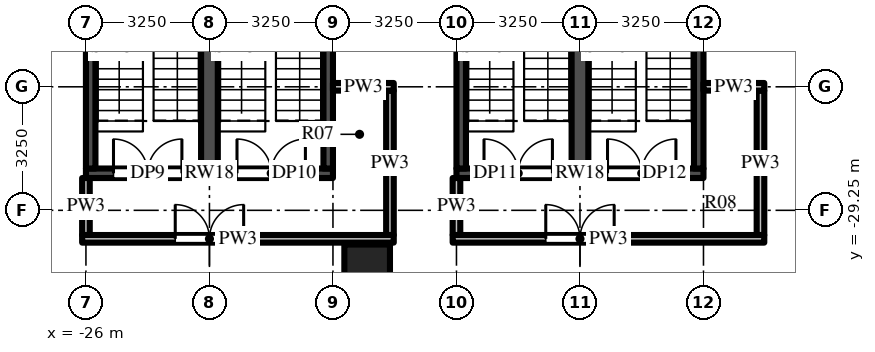
"""IFC4 building model, lengths in metres.
Left out: names, types, materials, properties, quantities, classifications, styles, units other than length and angle.
Written with IfcOpenShell. Run it as: python <this file> out.ifc"""

import sys

from ifc_helpers import new_model, si_unit, direction, frame, frame_2d, origin, origin_2d, place, context, subcontext, project, spatial, rectangle, extrude, source, transform, mapped, element, fill, save


model = new_model("IFC4")
c1 = context("Model", 3, precision=1e-05, world=origin(), true_north=direction((0.0, 1.0)))
c2 = subcontext(c1, "Body", "Model", "MODEL_VIEW")
j1 = project(units=[si_unit("LENGTHUNIT", "METRE"), si_unit("PLANEANGLEUNIT", "RADIAN")], contexts=[c1])
p1 = place(None, origin())
s1 = spatial("IfcSite", under=j1, at=p1, CompositionType="ELEMENT")
p2 = place(p1, origin())
s2 = spatial("IfcBuilding", under=s1, at=p2, CompositionType="ELEMENT")
p3 = place(p2, frame((0.0, 0.0, 8.0)))
s3 = spatial("IfcBuildingStorey", under=s2, at=p3, CompositionType="ELEMENT", Elevation=8.0)
m1 = source(origin(), c2, "Body", "SweptSolid", [
    extrude(rectangle(XDim=1.2, YDim=1.2, at=origin_2d()), origin(), (0.0, 0.0, 1.0), 6.0),
])
p4 = place(p3, frame((-18.6, -30.75, 0.0), z_axis=(0.0, 0.0, 1.0), x_axis=(1.0, 0.0, 0.0)))
e1 = element("IfcColumn", 1, at=p4, inside=s3, PredefinedType="COLUMN", context=c2, shape_type="MappedRepresentation", body=[
    mapped(m1, transform((0.0, 0.0, 0.0))),
])
m2 = source(origin(), c2, "Body", "SweptSolid", [
    extrude(rectangle(XDim=6.5, YDim=0.25, at=frame_2d((3.25, 0.0))), origin(), (0.0, 0.0, 1.0), 5.7),
])
p5 = place(p3, frame((-26.0, -28.275, 0.0), z_axis=(0.0, 0.0, 1.0), x_axis=(1.0, 0.0, 0.0)))
e2 = element("IfcWall", 2, at=p5, inside=s3, PredefinedType="SHEAR", context=c2, shape_type="MappedRepresentation", body=[
    mapped(m2, transform((0.0, 0.0, 0.0))),
])
m3 = source(origin(), c2, "Body", "SweptSolid", [
    extrude(rectangle(XDim=1.8, YDim=2.1, at=frame_2d((0.9, 1.05))), frame((0.0, 0.135, 0.0), z_axis=(0.0, -1.0, 0.0), x_axis=(1.0, 0.0, 0.0)), (0.0, 0.0, 1.0), 0.27),
])
p6 = place(p5, frame((0.725, 0.0, 0.0)))
e3 = element("IfcOpeningElement", 3, at=p6, cuts=e2, PredefinedType="OPENING", context=c2, shape_type="MappedRepresentation", body=[
    mapped(m3, transform((0.0, 0.0, 0.0))),
])
p7 = place(p5, frame((3.975, 0.0, 0.0)))
e4 = element("IfcOpeningElement", 4, at=p7, cuts=e2, PredefinedType="OPENING", context=c2, shape_type="MappedRepresentation", body=[
    mapped(m3, transform((0.0, 0.0, 0.0))),
])
m4 = source(origin(), c2, "Body", "SweptSolid", [
    extrude(rectangle(XDim=8.3, YDim=0.25, at=frame_2d((4.15, 0.0))), origin(), (0.0, 0.0, 1.0), 5.7),
])
for number, where, z_axis, x_axis in (
    (5, (-25.875, -28.15, 0.0), (0.0, 0.0, 1.0), (0.0, 1.0, 0.0)),
    (6, (-19.625, -28.15, 0.0), (0.0, 0.0, 1.0), (0.0, 1.0, 0.0)),
):
    element("IfcWall", number, at=place(p3, frame(where, z_axis=z_axis, x_axis=x_axis)), inside=s3, PredefinedType="SHEAR", context=c2, shape_type="MappedRepresentation", body=[
        mapped(m4, transform((0.0, 0.0, 0.0))),
    ])
m5 = source(origin(), c2, "Body", "SweptSolid", [
    extrude(rectangle(XDim=8.3, YDim=0.44, at=frame_2d((4.15, 0.0))), origin(), (0.0, 0.0, 1.0), 5.7),
])
p8 = place(p3, frame((-22.75, -28.15, 0.0), z_axis=(0.0, 0.0, 1.0), x_axis=(0.0, 1.0, 0.0)))
e7 = element("IfcWall", 7, at=p8, inside=s3, PredefinedType="SHEAR", context=c2, shape_type="MappedRepresentation", body=[
    mapped(m5, transform((0.0, 0.0, 0.0))),
])
p9 = place(p3, frame((-16.25, -28.275, 0.0), z_axis=(0.0, 0.0, 1.0), x_axis=(1.0, 0.0, 0.0)))
e8 = element("IfcWall", 8, at=p9, inside=s3, PredefinedType="SHEAR", context=c2, shape_type="MappedRepresentation", body=[
    mapped(m2, transform((0.0, 0.0, 0.0))),
])
p10 = place(p9, frame((0.725, 0.0, 0.0)))
e9 = element("IfcOpeningElement", 9, at=p10, cuts=e8, PredefinedType="OPENING", context=c2, shape_type="MappedRepresentation", body=[
    mapped(m3, transform((0.0, 0.0, 0.0))),
])
p11 = place(p9, frame((3.975, 0.0, 0.0)))
e10 = element("IfcOpeningElement", 10, at=p11, cuts=e8, PredefinedType="OPENING", context=c2, shape_type="MappedRepresentation", body=[
    mapped(m3, transform((0.0, 0.0, 0.0))),
])
for number, where, z_axis, x_axis in (
    (11, (-16.125, -28.15, 0.0), (0.0, 0.0, 1.0), (0.0, 1.0, 0.0)),
    (12, (-9.875, -28.15, 0.0), (0.0, 0.0, 1.0), (0.0, 1.0, 0.0)),
):
    element("IfcWall", number, at=place(p3, frame(where, z_axis=z_axis, x_axis=x_axis)), inside=s3, PredefinedType="SHEAR", context=c2, shape_type="MappedRepresentation", body=[
        mapped(m4, transform((0.0, 0.0, 0.0))),
    ])
p12 = place(p3, frame((-13.0, -28.15, 0.0), z_axis=(0.0, 0.0, 1.0), x_axis=(0.0, 1.0, 0.0)))
e13 = element("IfcWall", 13, at=p12, inside=s3, PredefinedType="SHEAR", context=c2, shape_type="MappedRepresentation", body=[
    mapped(m5, transform((0.0, 0.0, 0.0))),
])
m6 = source(origin(), c2, "Body", "SweptSolid", [
    extrude(rectangle(XDim=1.5, YDim=0.2, at=frame_2d((0.75, 0.0))), origin(), (0.0, 0.0, 1.0), 5.7),
])
p13 = place(p3, frame((-26.0, -28.4, 0.0), z_axis=(0.0, 0.0, 1.0), x_axis=(0.0, -1.0, 0.0)))
e14 = element("IfcWall", 14, at=p13, inside=s3, PredefinedType="PARTITIONING", context=c2, shape_type="MappedRepresentation", body=[
    mapped(m6, transform((0.0, 0.0, 0.0))),
])
m7 = source(origin(), c2, "Body", "SweptSolid", [
    extrude(rectangle(XDim=3.8, YDim=0.2, at=frame_2d((1.9, 0.0))), origin(), (0.0, 0.0, 1.0), 5.223),
])
p14 = place(p3, frame((-18.0, -26.1, 0.0), z_axis=(0.0, 0.0, 1.0), x_axis=(0.0, -1.0, 0.0)))
e15 = element("IfcWall", 15, at=p14, inside=s3, PredefinedType="PARTITIONING", context=c2, shape_type="MappedRepresentation", body=[
    mapped(m7, transform((0.0, 0.0, 0.0))),
])
p15 = place(p3, frame((-16.25, -29.9, 0.0), z_axis=(0.0, 0.0, 1.0), x_axis=(0.0, 1.0, 0.0)))
e16 = element("IfcWall", 16, at=p15, inside=s3, PredefinedType="PARTITIONING", context=c2, shape_type="MappedRepresentation", body=[
    mapped(m6, transform((0.0, 0.0, 0.0))),
])
p16 = place(p3, frame((-8.25, -29.9, 0.0), z_axis=(0.0, 0.0, 1.0), x_axis=(0.0, 1.0, 0.0)))
e17 = element("IfcWall", 17, at=p16, inside=s3, PredefinedType="PARTITIONING", context=c2, shape_type="MappedRepresentation", body=[
    mapped(m7, transform((0.0, 0.0, 0.0))),
])
m8 = source(origin(), c2, "Body", "SweptSolid", [
    extrude(rectangle(XDim=8.2, YDim=0.2, at=frame_2d((4.1, 0.0))), origin(), (0.0, 0.0, 1.0), 4.839),
])
p17 = place(p3, frame((-26.1, -30.0, 0.0), z_axis=(0.0, 0.0, 1.0), x_axis=(1.0, 0.0, 0.0)))
e18 = element("IfcWall", 18, at=p17, inside=s3, PredefinedType="PARTITIONING", context=c2, shape_type="MappedRepresentation", body=[
    mapped(m8, transform((0.0, 0.0, 0.0))),
])
m9 = source(origin(), c2, "Body", "SweptSolid", [
    extrude(rectangle(XDim=1.8, YDim=2.1, at=frame_2d((0.9, 1.05))), frame((0.0, 0.11, 0.0), z_axis=(0.0, -1.0, 0.0), x_axis=(1.0, 0.0, 0.0)), (0.0, 0.0, 1.0), 0.22),
])
p18 = place(p17, frame((2.45, 0.0, 0.0)))
e19 = element("IfcOpeningElement", 19, at=p18, cuts=e18, PredefinedType="OPENING", context=c2, shape_type="MappedRepresentation", body=[
    mapped(m9, transform((0.0, 0.0, 0.0))),
])
m10 = source(origin(), c2, "Body", "SweptSolid", [
    extrude(rectangle(XDim=8.2, YDim=0.2, at=frame_2d((4.1, 0.0))), origin(), (0.0, 0.0, 1.0), 5.7),
])
p19 = place(p3, frame((-16.35, -30.0, 0.0), z_axis=(0.0, 0.0, 1.0), x_axis=(1.0, 0.0, 0.0)))
e20 = element("IfcWall", 20, at=p19, inside=s3, PredefinedType="PARTITIONING", context=c2, shape_type="MappedRepresentation", body=[
    mapped(m10, transform((0.0, 0.0, 0.0))),
])
p20 = place(p19, frame((2.45, 0.0, 0.0)))
e21 = element("IfcOpeningElement", 21, at=p20, cuts=e20, PredefinedType="OPENING", context=c2, shape_type="MappedRepresentation", body=[
    mapped(m9, transform((0.0, 0.0, 0.0))),
])
m11 = source(origin(), c2, "Body", "SweptSolid", [
    extrude(rectangle(XDim=1.6, YDim=0.2, at=frame_2d((0.8, 0.0))), origin(), (0.0, 0.0, 1.0), 4.839),
])
p21 = place(p3, frame((-19.5, -26.0, 0.0), z_axis=(0.0, 0.0, 1.0), x_axis=(1.0, 0.0, 0.0)))
e22 = element("IfcWall", 22, at=p21, inside=s3, PredefinedType="PARTITIONING", context=c2, shape_type="MappedRepresentation", body=[
    mapped(m11, transform((0.0, 0.0, 0.0))),
])
m12 = source(origin(), c2, "Body", "SweptSolid", [
    extrude(rectangle(XDim=1.6, YDim=0.2, at=frame_2d((0.8, 0.0))), origin(), (0.0, 0.0, 1.0), 5.7),
])
p22 = place(p3, frame((-9.75, -26.0, 0.0), z_axis=(0.0, 0.0, 1.0), x_axis=(1.0, 0.0, 0.0)))
e23 = element("IfcWall", 23, at=p22, inside=s3, PredefinedType="PARTITIONING", context=c2, shape_type="MappedRepresentation", body=[
    mapped(m12, transform((0.0, 0.0, 0.0))),
])
m13 = source(origin(), c2, "Body", "SweptSolid", [
    extrude(rectangle(XDim=1.8, YDim=2.1, at=frame_2d((0.9, 1.05))), frame((0.0, 0.025, 0.0), z_axis=(0.0, -1.0, 0.0), x_axis=(1.0, 0.0, 0.0)), (0.0, 0.0, 1.0), 0.05),
])
p23 = place(p6, origin())
e24 = element("IfcDoor", 24, at=p23, inside=s3, OperationType="DOUBLE_DOOR_SINGLE_SWING", PredefinedType="DOOR", context=c2, shape_type="MappedRepresentation", body=[
    mapped(m13, transform((0.0, 0.0, 0.0))),
])
fill(e3, e24)
p24 = place(p7, origin())
e25 = element("IfcDoor", 25, at=p24, inside=s3, OperationType="DOUBLE_DOOR_SINGLE_SWING", PredefinedType="DOOR", context=c2, shape_type="MappedRepresentation", body=[
    mapped(m13, transform((0.0, 0.0, 0.0))),
])
fill(e4, e25)
p25 = place(p10, origin())
e26 = element("IfcDoor", 26, at=p25, inside=s3, OperationType="DOUBLE_DOOR_SINGLE_SWING", PredefinedType="DOOR", context=c2, shape_type="MappedRepresentation", body=[
    mapped(m13, transform((0.0, 0.0, 0.0))),
])
fill(e9, e26)
p26 = place(p11, origin())
e27 = element("IfcDoor", 27, at=p26, inside=s3, OperationType="DOUBLE_DOOR_SINGLE_SWING", PredefinedType="DOOR", context=c2, shape_type="MappedRepresentation", body=[
    mapped(m13, transform((0.0, 0.0, 0.0))),
])
fill(e10, e27)
p27 = place(p18, origin())
e28 = element("IfcDoor", 28, at=p27, inside=s3, OperationType="DOUBLE_DOOR_SINGLE_SWING", PredefinedType="DOOR", context=c2, shape_type="MappedRepresentation", body=[
    mapped(m13, transform((0.0, 0.0, 0.0))),
])
fill(e19, e28)
p28 = place(p20, origin())
e29 = element("IfcDoor", 29, at=p28, inside=s3, OperationType="DOUBLE_DOOR_SINGLE_SWING", PredefinedType="DOOR", context=c2, shape_type="MappedRepresentation", body=[
    mapped(m13, transform((0.0, 0.0, 0.0))),
])
fill(e21, e29)
save(model, sys.argv[1])
